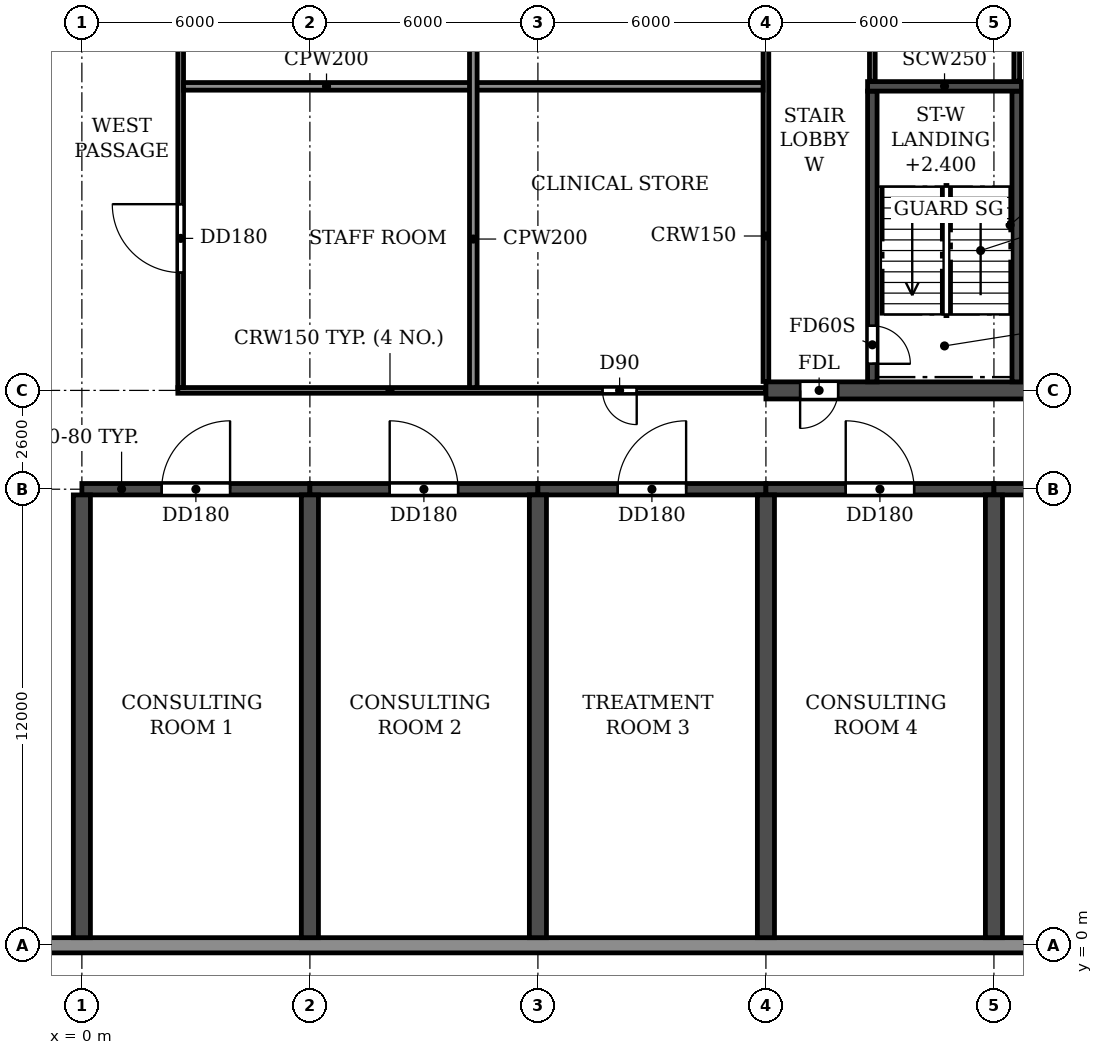
"""IFC4 building model, lengths in metres.
Left out: names, types, materials, properties, quantities, classifications, styles, units other than length and angle.
Written with IfcOpenShell. Run it as: python <this file> out.ifc"""

import sys

from ifc_helpers import new_model, si_unit, direction, frame, frame_2d, origin, place, context, subcontext, project, spatial, rectangle, extrude, element, fill, save


model = new_model("IFC4")
c1 = context("Model", 3, precision=1e-05, world=origin(), true_north=direction((0.0, 1.0)))
c2 = subcontext(c1, "Body", "Model", "MODEL_VIEW")
j1 = project(units=[si_unit("LENGTHUNIT", "METRE"), si_unit("PLANEANGLEUNIT", "RADIAN")], contexts=[c1])
p1 = place(None, origin())
s1 = spatial("IfcSite", under=j1, at=p1, CompositionType="ELEMENT")
p2 = place(p1, origin())
s2 = spatial("IfcBuilding", under=s1, at=p2, CompositionType="ELEMENT")
p3 = place(p2, frame((0.0, 0.0, 6.0)))
s3 = spatial("IfcBuildingStorey", under=s2, at=p3, CompositionType="ELEMENT", Elevation=6.0)
for number, where, z_axis, x_axis in (
    (1, (0.0, 0.2, 0.0), (0.0, 0.0, 1.0), (0.0, 1.0, 0.0)),
    (2, (6.0, 0.2, 0.0), (0.0, 0.0, 1.0), (0.0, 1.0, 0.0)),
    (3, (12.0, 0.2, 0.0), (0.0, 0.0, 1.0), (0.0, 1.0, 0.0)),
    (4, (18.0, 0.2, 0.0), (0.0, 0.0, 1.0), (0.0, 1.0, 0.0)),
    (5, (24.0, 0.2, 0.0), (0.0, 0.0, 1.0), (0.0, 1.0, 0.0)),
):
    element("IfcWall", number, at=place(p3, frame(where, z_axis=z_axis, x_axis=x_axis)), inside=s3, PredefinedType="SHEAR", context=c2, shape_type="SweptSolid", body=[
        extrude(rectangle(XDim=11.65, YDim=0.45, at=frame_2d((5.825, 0.0))), origin(), (0.0, 0.0, 1.0), 4.52),
    ])
p4 = place(p3, frame((0.0, 12.0, 0.0), z_axis=(0.0, 0.0, 1.0), x_axis=(1.0, 0.0, 0.0)))
e6 = element("IfcWall", 6, at=p4, inside=s3, PredefinedType="SHEAR", context=c2, shape_type="SweptSolid", body=[
    extrude(rectangle(XDim=6.0, YDim=0.3, at=frame_2d((3.0, 0.0))), origin(), (0.0, 0.0, 1.0), 3.92),
])
p5 = place(p4, frame((2.1, 0.0, 0.0)))
e7 = element("IfcOpeningElement", 7, at=p5, cuts=e6, PredefinedType="OPENING", context=c2, shape_type="SweptSolid", body=[
    extrude(rectangle(XDim=1.8, YDim=2.1, at=frame_2d((0.9, 1.05))), frame((0.0, 0.16, 0.0), z_axis=(0.0, -1.0, 0.0), x_axis=(1.0, 0.0, 0.0)), (0.0, 0.0, 1.0), 0.32),
])
p6 = place(p3, frame((6.0, 12.0, 0.0), z_axis=(0.0, 0.0, 1.0), x_axis=(1.0, 0.0, 0.0)))
e8 = element("IfcWall", 8, at=p6, inside=s3, PredefinedType="SHEAR", context=c2, shape_type="SweptSolid", body=[
    extrude(rectangle(XDim=6.0, YDim=0.3, at=frame_2d((3.0, 0.0))), origin(), (0.0, 0.0, 1.0), 3.92),
])
p7 = place(p6, frame((2.1, 0.0, 0.0)))
e9 = element("IfcOpeningElement", 9, at=p7, cuts=e8, PredefinedType="OPENING", context=c2, shape_type="SweptSolid", body=[
    extrude(rectangle(XDim=1.8, YDim=2.1, at=frame_2d((0.9, 1.05))), frame((0.0, 0.16, 0.0), z_axis=(0.0, -1.0, 0.0), x_axis=(1.0, 0.0, 0.0)), (0.0, 0.0, 1.0), 0.32),
])
p8 = place(p3, frame((12.0, 12.0, 0.0), z_axis=(0.0, 0.0, 1.0), x_axis=(1.0, 0.0, 0.0)))
e10 = element("IfcWall", 10, at=p8, inside=s3, PredefinedType="SHEAR", context=c2, shape_type="SweptSolid", body=[
    extrude(rectangle(XDim=6.0, YDim=0.3, at=frame_2d((3.0, 0.0))), origin(), (0.0, 0.0, 1.0), 3.92),
])
p9 = place(p8, frame((2.1, 0.0, 0.0)))
e11 = element("IfcOpeningElement", 11, at=p9, cuts=e10, PredefinedType="OPENING", context=c2, shape_type="SweptSolid", body=[
    extrude(rectangle(XDim=1.8, YDim=2.1, at=frame_2d((0.9, 1.05))), frame((0.0, 0.16, 0.0), z_axis=(0.0, -1.0, 0.0), x_axis=(1.0, 0.0, 0.0)), (0.0, 0.0, 1.0), 0.32),
])
p10 = place(p3, frame((18.0, 12.0, 0.0), z_axis=(0.0, 0.0, 1.0), x_axis=(1.0, 0.0, 0.0)))
e12 = element("IfcWall", 12, at=p10, inside=s3, PredefinedType="SHEAR", context=c2, shape_type="SweptSolid", body=[
    extrude(rectangle(XDim=6.0, YDim=0.3, at=frame_2d((3.0, 0.0))), origin(), (0.0, 0.0, 1.0), 3.92),
])
p11 = place(p10, frame((2.1, 0.0, 0.0)))
e13 = element("IfcOpeningElement", 13, at=p11, cuts=e12, PredefinedType="OPENING", context=c2, shape_type="SweptSolid", body=[
    extrude(rectangle(XDim=1.8, YDim=2.1, at=frame_2d((0.9, 1.05))), frame((0.0, 0.16, 0.0), z_axis=(0.0, -1.0, 0.0), x_axis=(1.0, 0.0, 0.0)), (0.0, 0.0, 1.0), 0.32),
])
p12 = place(p3, frame((24.0, 12.0, 0.0), z_axis=(0.0, 0.0, 1.0), x_axis=(1.0, 0.0, 0.0)))
e14 = element("IfcWall", 14, at=p12, inside=s3, PredefinedType="SHEAR", context=c2, shape_type="SweptSolid", body=[
    extrude(rectangle(XDim=6.0, YDim=0.3, at=frame_2d((3.0, 0.0))), origin(), (0.0, 0.0, 1.0), 3.92),
])
p13 = place(p12, frame((2.1, 0.0, 0.0)))
e15 = element("IfcOpeningElement", 15, at=p13, cuts=e14, PredefinedType="OPENING", context=c2, shape_type="SweptSolid", body=[
    extrude(rectangle(XDim=1.8, YDim=2.1, at=frame_2d((0.9, 1.05))), frame((0.0, 0.16, 0.0), z_axis=(0.0, -1.0, 0.0), x_axis=(1.0, 0.0, 0.0)), (0.0, 0.0, 1.0), 0.32),
])
p14 = place(p3, frame((18.0, 14.6, 0.0), z_axis=(0.0, 0.0, 1.0), x_axis=(1.0, 0.0, 0.0)))
e16 = element("IfcWall", 16, at=p14, inside=s3, PredefinedType="SOLIDWALL", context=c2, shape_type="SweptSolid", body=[
    extrude(rectangle(XDim=66.0, YDim=0.45, at=frame_2d((33.0, 0.0))), origin(), (0.0, 0.0, 1.0), 4.52),
])
p15 = place(p14, frame((0.9, 0.0, 0.0)))
e17 = element("IfcOpeningElement", 17, at=p15, cuts=e16, PredefinedType="OPENING", context=c2, shape_type="SweptSolid", body=[
    extrude(rectangle(XDim=1.0, YDim=2.1, at=frame_2d((0.5, 1.05))), frame((0.0, 0.235, 0.0), z_axis=(0.0, -1.0, 0.0), x_axis=(1.0, 0.0, 0.0)), (0.0, 0.0, 1.0), 0.47),
])
p16 = place(p14, frame((8.8, 0.0, 0.0)))
e18 = element("IfcOpeningElement", 18, at=p16, cuts=e16, PredefinedType="OPENING", context=c2, shape_type="SweptSolid", body=[
    extrude(rectangle(XDim=1.0, YDim=2.1, at=frame_2d((0.5, 1.05))), frame((0.0, 0.235, 0.0), z_axis=(0.0, -1.0, 0.0), x_axis=(1.0, 0.0, 0.0)), (0.0, 0.0, 1.0), 0.47),
])
p17 = place(p14, frame((13.4, 0.0, 0.0)))
e19 = element("IfcOpeningElement", 19, at=p17, cuts=e16, PredefinedType="OPENING", context=c2, shape_type="SweptSolid", body=[
    extrude(rectangle(XDim=1.0, YDim=2.1, at=frame_2d((0.5, 1.05))), frame((0.0, 0.235, 0.0), z_axis=(0.0, -1.0, 0.0), x_axis=(1.0, 0.0, 0.0)), (0.0, 0.0, 1.0), 0.47),
])
p18 = place(p14, frame((26.0, 0.0, 0.0)))
e20 = element("IfcOpeningElement", 20, at=p18, cuts=e16, PredefinedType="OPENING", context=c2, shape_type="SweptSolid", body=[
    extrude(rectangle(XDim=1.0, YDim=2.1, at=frame_2d((0.5, 1.05))), frame((0.0, 0.235, 0.0), z_axis=(0.0, -1.0, 0.0), x_axis=(1.0, 0.0, 0.0)), (0.0, 0.0, 1.0), 0.47),
])
p19 = place(p14, frame((29.9, 0.0, 0.0)))
e21 = element("IfcOpeningElement", 21, at=p19, cuts=e16, PredefinedType="OPENING", context=c2, shape_type="SweptSolid", body=[
    extrude(rectangle(XDim=1.0, YDim=2.1, at=frame_2d((0.5, 1.05))), frame((0.0, 0.235, 0.0), z_axis=(0.0, -1.0, 0.0), x_axis=(1.0, 0.0, 0.0)), (0.0, 0.0, 1.0), 0.47),
])
p20 = place(p14, frame((32.5, 0.0, 0.0)))
e22 = element("IfcOpeningElement", 22, at=p20, cuts=e16, PredefinedType="OPENING", context=c2, shape_type="SweptSolid", body=[
    extrude(rectangle(XDim=1.0, YDim=2.1, at=frame_2d((0.5, 1.05))), frame((0.0, 0.235, 0.0), z_axis=(0.0, -1.0, 0.0), x_axis=(1.0, 0.0, 0.0)), (0.0, 0.0, 1.0), 0.47),
])
p21 = place(p14, frame((37.7, 0.0, 0.0)))
e23 = element("IfcOpeningElement", 23, at=p21, cuts=e16, PredefinedType="OPENING", context=c2, shape_type="SweptSolid", body=[
    extrude(rectangle(XDim=1.0, YDim=2.1, at=frame_2d((0.5, 1.05))), frame((0.0, 0.235, 0.0), z_axis=(0.0, -1.0, 0.0), x_axis=(1.0, 0.0, 0.0)), (0.0, 0.0, 1.0), 0.47),
])
p22 = place(p14, frame((51.6, 0.0, 0.0)))
e24 = element("IfcOpeningElement", 24, at=p22, cuts=e16, PredefinedType="OPENING", context=c2, shape_type="SweptSolid", body=[
    extrude(rectangle(XDim=1.0, YDim=2.1, at=frame_2d((0.5, 1.05))), frame((0.0, 0.235, 0.0), z_axis=(0.0, -1.0, 0.0), x_axis=(1.0, 0.0, 0.0)), (0.0, 0.0, 1.0), 0.47),
])
p23 = place(p14, frame((56.2, 0.0, 0.0)))
e25 = element("IfcOpeningElement", 25, at=p23, cuts=e16, PredefinedType="OPENING", context=c2, shape_type="SweptSolid", body=[
    extrude(rectangle(XDim=1.0, YDim=2.1, at=frame_2d((0.5, 1.05))), frame((0.0, 0.235, 0.0), z_axis=(0.0, -1.0, 0.0), x_axis=(1.0, 0.0, 0.0)), (0.0, 0.0, 1.0), 0.47),
])
p24 = place(p14, frame((64.1, 0.0, 0.0)))
e26 = element("IfcOpeningElement", 26, at=p24, cuts=e16, PredefinedType="OPENING", context=c2, shape_type="SweptSolid", body=[
    extrude(rectangle(XDim=1.0, YDim=2.1, at=frame_2d((0.5, 1.05))), frame((0.0, 0.235, 0.0), z_axis=(0.0, -1.0, 0.0), x_axis=(1.0, 0.0, 0.0)), (0.0, 0.0, 1.0), 0.47),
])
p25 = place(p3, frame((20.8, 14.825, 0.0), z_axis=(0.0, 0.0, 1.0), x_axis=(0.0, 1.0, 0.0)))
e27 = element("IfcWall", 27, at=p25, inside=s3, PredefinedType="SOLIDWALL", context=c2, shape_type="SweptSolid", body=[
    extrude(rectangle(XDim=7.65, YDim=0.25, at=frame_2d((3.825, 0.0))), origin(), (0.0, 0.0, 1.0), 4.52),
])
p26 = place(p25, frame((0.475, 0.0, 0.0)))
e28 = element("IfcOpeningElement", 28, at=p26, cuts=e27, PredefinedType="OPENING", context=c2, shape_type="SweptSolid", body=[
    extrude(rectangle(XDim=1.0, YDim=2.1, at=frame_2d((0.5, 1.05))), frame((0.0, 0.135, 0.0), z_axis=(0.0, -1.0, 0.0), x_axis=(1.0, 0.0, 0.0)), (0.0, 0.0, 1.0), 0.27),
])
p27 = place(p3, frame((24.6, 14.825, 0.0), z_axis=(0.0, 0.0, 1.0), x_axis=(0.0, 1.0, 0.0)))
e29 = element("IfcWall", 29, at=p27, inside=s3, PredefinedType="SOLIDWALL", context=c2, shape_type="SweptSolid", body=[
    extrude(rectangle(XDim=7.65, YDim=0.25, at=frame_2d((3.825, 0.0))), origin(), (0.0, 0.0, 1.0), 4.52),
])
p28 = place(p3, frame((20.675, 22.6, 0.0), z_axis=(0.0, 0.0, 1.0), x_axis=(1.0, 0.0, 0.0)))
e30 = element("IfcWall", 30, at=p28, inside=s3, PredefinedType="SOLIDWALL", context=c2, shape_type="SweptSolid", body=[
    extrude(rectangle(XDim=4.05, YDim=0.25, at=frame_2d((2.025, 0.0))), origin(), (0.0, 0.0, 1.0), 4.52),
])
p29 = place(p3, frame((-3.0, 0.0, 0.0), z_axis=(0.0, 0.0, 1.0), x_axis=(1.0, 0.0, 0.0)))
e31 = element("IfcWall", 31, at=p29, inside=s3, PredefinedType="STANDARD", context=c2, shape_type="SweptSolid", body=[
    extrude(rectangle(XDim=108.0, YDim=0.4, at=frame_2d((54.0, 0.0))), origin(), (0.0, 0.0, 1.0), 4.52),
])
p30 = place(p3, frame((2.525, 14.6, 0.0), z_axis=(0.0, 0.0, 1.0), x_axis=(1.0, 0.0, 0.0)))
e32 = element("IfcWall", 32, at=p30, inside=s3, PredefinedType="PARTITIONING", context=c2, shape_type="SweptSolid", body=[
    extrude(rectangle(XDim=15.465, YDim=0.15, at=frame_2d((7.732, 0.0))), origin(), (0.0, 0.0, 1.0), 4.52),
])
p31 = place(p30, frame((11.175, 0.0, 0.0)))
e33 = element("IfcOpeningElement", 33, at=p31, cuts=e32, PredefinedType="OPENING", context=c2, shape_type="SweptSolid", body=[
    extrude(rectangle(XDim=0.9, YDim=2.1, at=frame_2d((0.45, 1.05))), frame((0.0, 0.085, 0.0), z_axis=(0.0, -1.0, 0.0), x_axis=(1.0, 0.0, 0.0)), (0.0, 0.0, 1.0), 0.17),
])
p32 = place(p3, frame((2.6, 14.675, 0.0), z_axis=(0.0, 0.0, 1.0), x_axis=(0.0, 1.0, 0.0)))
e34 = element("IfcWall", 34, at=p32, inside=s3, PredefinedType="PARTITIONING", context=c2, shape_type="SweptSolid", body=[
    extrude(rectangle(XDim=13.05, YDim=0.15, at=frame_2d((6.525, 0.0))), origin(), (0.0, 0.0, 1.0), 4.52),
])
p33 = place(p32, frame((3.025, 0.0, 0.0)))
e35 = element("IfcOpeningElement", 35, at=p33, cuts=e34, PredefinedType="OPENING", context=c2, shape_type="SweptSolid", body=[
    extrude(rectangle(XDim=1.8, YDim=2.1, at=frame_2d((0.9, 1.05))), frame((0.0, 0.085, 0.0), z_axis=(0.0, -1.0, 0.0), x_axis=(1.0, 0.0, 0.0)), (0.0, 0.0, 1.0), 0.17),
])
p34 = place(p3, frame((18.0, 14.835, 0.0), z_axis=(0.0, 0.0, 1.0), x_axis=(0.0, 1.0, 0.0)))
e36 = element("IfcWall", 36, at=p34, inside=s3, PredefinedType="PARTITIONING", context=c2, shape_type="SweptSolid", body=[
    extrude(rectangle(XDim=12.73, YDim=0.15, at=frame_2d((6.365, 0.0))), origin(), (0.0, 0.0, 1.0), 4.52),
])
p35 = place(p3, frame((2.675, 22.6, 0.0), z_axis=(0.0, 0.0, 1.0), x_axis=(1.0, 0.0, 0.0)))
e37 = element("IfcWall", 37, at=p35, inside=s3, PredefinedType="PARTITIONING", context=c2, shape_type="SweptSolid", body=[
    extrude(rectangle(XDim=15.25, YDim=0.2, at=frame_2d((7.625, 0.0))), origin(), (0.0, 0.0, 1.0), 4.52),
])
p36 = place(p3, frame((24.735, 22.6, 0.0), z_axis=(0.0, 0.0, 1.0), x_axis=(1.0, 0.0, 0.0)))
e38 = element("IfcWall", 38, at=p36, inside=s3, PredefinedType="PARTITIONING", context=c2, shape_type="SweptSolid", body=[
    extrude(rectangle(XDim=5.13, YDim=0.2, at=frame_2d((2.565, 0.0))), origin(), (0.0, 0.0, 1.0), 4.52),
])
p37 = place(p3, frame((10.3, 14.675, 0.0), z_axis=(0.0, 0.0, 1.0), x_axis=(0.0, 1.0, 0.0)))
e39 = element("IfcWall", 39, at=p37, inside=s3, PredefinedType="PARTITIONING", context=c2, shape_type="SweptSolid", body=[
    extrude(rectangle(XDim=13.05, YDim=0.2, at=frame_2d((6.525, 0.0))), origin(), (0.0, 0.0, 1.0), 4.52),
])
for number, where, z_axis, x_axis in (
    (40, (20.8, 22.735, 0.0), (0.0, 0.0, 1.0), (0.0, 1.0, 0.0)),
    (41, (24.6, 22.735, 0.0), (0.0, 0.0, 1.0), (0.0, 1.0, 0.0)),
):
    element("IfcWall", number, at=place(p3, frame(where, z_axis=z_axis, x_axis=x_axis)), inside=s3, PredefinedType="PARTITIONING", context=c2, shape_type="SweptSolid", body=[
        extrude(rectangle(XDim=4.83, YDim=0.15, at=frame_2d((2.415, 0.0))), origin(), (0.0, 0.0, 1.0), 4.52),
    ])
p38 = place(p5, origin())
e42 = element("IfcDoor", 42, at=p38, inside=s3, OperationType="DOUBLE_DOOR_SINGLE_SWING", PredefinedType="DOOR", context=c2, shape_type="SweptSolid", body=[
    extrude(rectangle(XDim=1.8, YDim=2.1, at=frame_2d((0.9, 1.05))), frame((0.0, 0.025, 0.0), z_axis=(0.0, -1.0, 0.0), x_axis=(1.0, 0.0, 0.0)), (0.0, 0.0, 1.0), 0.05),
])
fill(e7, e42)
p39 = place(p7, origin())
e43 = element("IfcDoor", 43, at=p39, inside=s3, OperationType="DOUBLE_DOOR_SINGLE_SWING", PredefinedType="DOOR", context=c2, shape_type="SweptSolid", body=[
    extrude(rectangle(XDim=1.8, YDim=2.1, at=frame_2d((0.9, 1.05))), frame((0.0, 0.025, 0.0), z_axis=(0.0, -1.0, 0.0), x_axis=(1.0, 0.0, 0.0)), (0.0, 0.0, 1.0), 0.05),
])
fill(e9, e43)
p40 = place(p31, frame((0.9, 0.0, 0.0), z_axis=(0.0, 0.0, 1.0), x_axis=(-1.0, 0.0, 0.0)))
e44 = element("IfcDoor", 44, at=p40, inside=s3, OperationType="SINGLE_SWING_LEFT", PredefinedType="DOOR", context=c2, shape_type="SweptSolid", body=[
    extrude(rectangle(XDim=0.9, YDim=2.1, at=frame_2d((0.45, 1.05))), frame((0.0, 0.025, 0.0), z_axis=(0.0, -1.0, 0.0), x_axis=(1.0, 0.0, 0.0)), (0.0, 0.0, 1.0), 0.05),
])
fill(e33, e44)
p41 = place(p9, origin())
e45 = element("IfcDoor", 45, at=p41, inside=s3, OperationType="DOUBLE_DOOR_SINGLE_SWING", PredefinedType="DOOR", context=c2, shape_type="SweptSolid", body=[
    extrude(rectangle(XDim=1.8, YDim=2.1, at=frame_2d((0.9, 1.05))), frame((0.0, 0.025, 0.0), z_axis=(0.0, -1.0, 0.0), x_axis=(1.0, 0.0, 0.0)), (0.0, 0.0, 1.0), 0.05),
])
fill(e11, e45)
p42 = place(p15, frame((1.0, 0.0, 0.0), z_axis=(0.0, 0.0, 1.0), x_axis=(-1.0, 0.0, 0.0)))
e46 = element("IfcDoor", 46, at=p42, inside=s3, OperationType="SINGLE_SWING_RIGHT", PredefinedType="DOOR", context=c2, shape_type="SweptSolid", body=[
    extrude(rectangle(XDim=1.0, YDim=2.1, at=frame_2d((0.5, 1.05))), frame((0.0, 0.025, 0.0), z_axis=(0.0, -1.0, 0.0), x_axis=(1.0, 0.0, 0.0)), (0.0, 0.0, 1.0), 0.05),
])
fill(e17, e46)
p43 = place(p11, origin())
e47 = element("IfcDoor", 47, at=p43, inside=s3, OperationType="DOUBLE_DOOR_SINGLE_SWING", PredefinedType="DOOR", context=c2, shape_type="SweptSolid", body=[
    extrude(rectangle(XDim=1.8, YDim=2.1, at=frame_2d((0.9, 1.05))), frame((0.0, 0.025, 0.0), z_axis=(0.0, -1.0, 0.0), x_axis=(1.0, 0.0, 0.0)), (0.0, 0.0, 1.0), 0.05),
])
fill(e13, e47)
p44 = place(p33, origin())
e48 = element("IfcDoor", 48, at=p44, inside=s3, OperationType="DOUBLE_DOOR_SINGLE_SWING", PredefinedType="DOOR", context=c2, shape_type="SweptSolid", body=[
    extrude(rectangle(XDim=1.8, YDim=2.1, at=frame_2d((0.9, 1.05))), frame((0.0, 0.025, 0.0), z_axis=(0.0, -1.0, 0.0), x_axis=(1.0, 0.0, 0.0)), (0.0, 0.0, 1.0), 0.05),
])
fill(e35, e48)
p45 = place(p26, frame((1.0, 0.0, 0.0), z_axis=(0.0, 0.0, 1.0), x_axis=(-1.0, 0.0, 0.0)))
e49 = element("IfcDoor", 49, at=p45, inside=s3, OperationType="SINGLE_SWING_RIGHT", PredefinedType="DOOR", context=c2, shape_type="SweptSolid", body=[
    extrude(rectangle(XDim=1.0, YDim=2.1, at=frame_2d((0.5, 1.05))), frame((0.0, 0.025, 0.0), z_axis=(0.0, -1.0, 0.0), x_axis=(1.0, 0.0, 0.0)), (0.0, 0.0, 1.0), 0.05),
])
fill(e28, e49)
save(model, sys.argv[1])
